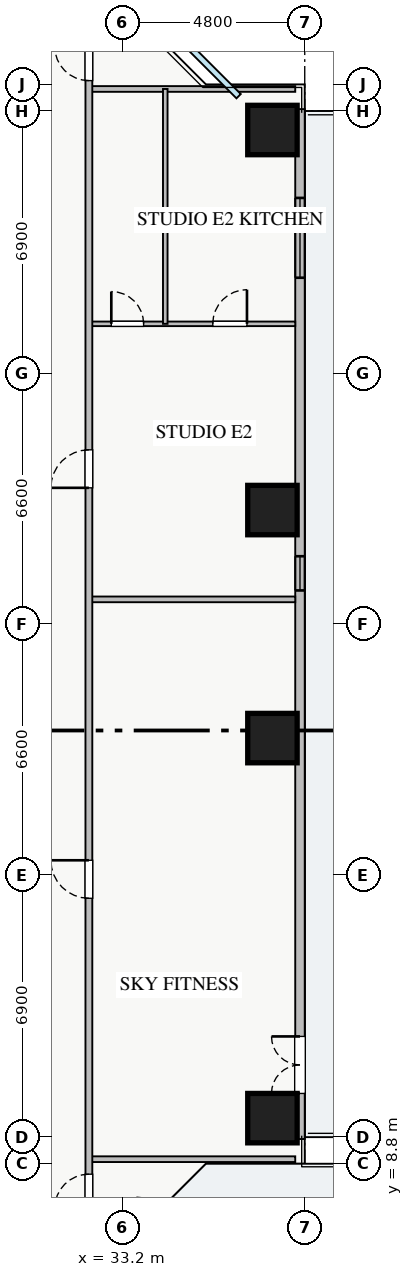
"""IFC4 building model, lengths in metres.
Left out: names, types, materials, properties, quantities, classifications, styles, units other than length and angle.
Written with IfcOpenShell. Run it as: python <this file> out.ifc"""

import sys

from ifc_helpers import new_model, si_unit, direction, frame, frame_2d, origin, origin_2d, place, context, subcontext, project, spatial, rectangle, extrude, source, transform, mapped, element, fill, save


model = new_model("IFC4")
c1 = context("Model", 3, precision=1e-05, world=origin(), true_north=direction((0.0, 1.0)))
c2 = subcontext(c1, "Body", "Model", "MODEL_VIEW")
j1 = project(units=[si_unit("LENGTHUNIT", "METRE"), si_unit("PLANEANGLEUNIT", "RADIAN")], contexts=[c1])
p1 = place(None, origin())
s1 = spatial("IfcSite", under=j1, at=p1, CompositionType="ELEMENT")
p2 = place(p1, origin())
s2 = spatial("IfcBuilding", under=s1, at=p2, CompositionType="ELEMENT")
p3 = place(p2, frame((0.0, 0.0, 23.0)))
s3 = spatial("IfcBuildingStorey", under=s2, at=p3, CompositionType="ELEMENT", Elevation=23.0)
m1 = source(origin(), c2, "Body", "SweptSolid", [
    extrude(rectangle(XDim=1.3, YDim=1.3, at=origin_2d()), origin(), (0.0, 0.0, 1.0), 3.25),
])
for number, where, z_axis, x_axis in (
    (1, (37.15, 10.0, 0.0), (0.0, 0.0, 1.0), (1.0, 0.0, 0.0)),
    (2, (37.15, 20.0, 0.0), (0.0, 0.0, 1.0), (1.0, 0.0, 0.0)),
    (3, (37.15, 26.0, 0.0), (0.0, 0.0, 1.0), (1.0, 0.0, 0.0)),
    (4, (37.15, 36.0, 0.0), (0.0, 0.0, 1.0), (1.0, 0.0, 0.0)),
):
    element("IfcColumn", number, at=place(p3, frame(where, z_axis=z_axis, x_axis=x_axis)), inside=s3, PredefinedType="COLUMN", context=c2, shape_type="MappedRepresentation", body=[
        mapped(m1, transform((0.0, 0.0, 0.0), x_axis=(1.0, 0.0, 0.0), y_axis=(0.0, 1.0, 0.0), z_axis=(0.0, 0.0, 1.0), scale=1.0)),
    ])
p4 = place(p3, frame((37.875, 9.45, 0.0), z_axis=(0.0, 0.0, 1.0), x_axis=(0.0, 1.0, 0.0)))
e5 = element("IfcWall", 5, at=p4, inside=s3, PredefinedType="STANDARD", context=c2, shape_type="SweptSolid", body=[
    extrude(rectangle(XDim=27.1, YDim=0.25, at=frame_2d((13.55, 0.0))), origin(), (0.0, 0.0, 1.0), 2.61),
])
p5 = place(p4, frame((1.2, 0.0, 0.0)))
e6 = element("IfcOpeningElement", 6, at=p5, cuts=e5, PredefinedType="OPENING", context=c2, shape_type="SweptSolid", body=[
    extrude(rectangle(XDim=1.5, YDim=2.15, at=frame_2d((0.75, 1.075))), frame((0.0, 0.135, 0.0), z_axis=(0.0, -1.0, 0.0), x_axis=(1.0, 0.0, 0.0)), (0.0, 0.0, 1.0), 0.27),
])
p6 = place(p4, frame((22.663, 0.0, 0.9)))
e7 = element("IfcOpeningElement", 7, at=p6, cuts=e5, PredefinedType="OPENING", context=c2, shape_type="SweptSolid", body=[
    extrude(rectangle(XDim=2.1, YDim=1.48, at=frame_2d((1.05, 0.74))), frame((0.0, 0.135, 0.0), z_axis=(0.0, -1.0, 0.0), x_axis=(1.0, 0.0, 0.0)), (0.0, 0.0, 1.0), 0.27),
])
p7 = place(p4, frame((14.435, 0.0, 0.9)))
e8 = element("IfcOpeningElement", 8, at=p7, cuts=e5, PredefinedType="OPENING", context=c2, shape_type="SweptSolid", body=[
    extrude(rectangle(XDim=0.9, YDim=1.2, at=frame_2d((0.45, 0.6))), frame((0.0, 0.135, 0.0), z_axis=(0.0, -1.0, 0.0), x_axis=(1.0, 0.0, 0.0)), (0.0, 0.0, 1.0), 0.27),
])
for number, where, z_axis, x_axis in (
    (9, (32.32, 37.08, 0.0), (0.0, 0.0, 1.0), (1.0, 0.0, 0.0)),
    (10, (32.32, 8.92, 0.0), (0.0, 0.0, 1.0), (1.0, 0.0, 0.0)),
):
    element("IfcWall", number, at=place(p3, frame(where, z_axis=z_axis, x_axis=x_axis)), inside=s3, PredefinedType="PARTITIONING", context=c2, shape_type="SweptSolid", body=[
        extrude(rectangle(XDim=5.43, YDim=0.15, at=frame_2d((2.715, 0.0))), origin(), (0.0, 0.0, 1.0), 3.07),
    ])
p8 = place(p3, frame((32.32, 30.9, 0.0), z_axis=(0.0, 0.0, 1.0), x_axis=(1.0, 0.0, 0.0)))
e11 = element("IfcWall", 11, at=p8, inside=s3, PredefinedType="PLUMBINGWALL", context=c2, shape_type="SweptSolid", body=[
    extrude(rectangle(XDim=5.43, YDim=0.12, at=frame_2d((2.715, 0.0))), origin(), (0.0, 0.0, 1.0), 3.07),
])
p9 = place(p8, frame((0.59, 0.0, 0.0)))
e12 = element("IfcOpeningElement", 12, at=p9, cuts=e11, PredefinedType="OPENING", context=c2, shape_type="SweptSolid", body=[
    extrude(rectangle(XDim=0.85, YDim=2.05, at=frame_2d((0.425, 1.025))), frame((0.0, 0.07, 0.0), z_axis=(0.0, -1.0, 0.0), x_axis=(1.0, 0.0, 0.0)), (0.0, 0.0, 1.0), 0.14),
])
p10 = place(p8, frame((3.26, 0.0, 0.0)))
e13 = element("IfcOpeningElement", 13, at=p10, cuts=e11, PredefinedType="OPENING", context=c2, shape_type="SweptSolid", body=[
    extrude(rectangle(XDim=0.9, YDim=2.05, at=frame_2d((0.45, 1.025))), frame((0.0, 0.07, 0.0), z_axis=(0.0, -1.0, 0.0), x_axis=(1.0, 0.0, 0.0)), (0.0, 0.0, 1.0), 0.14),
])
p11 = place(p3, frame((34.33, 30.9, 0.0), z_axis=(0.0, 0.0, 1.0), x_axis=(0.0, 1.0, 0.0)))
e14 = element("IfcWall", 14, at=p11, inside=s3, PredefinedType="PLUMBINGWALL", context=c2, shape_type="SweptSolid", body=[
    extrude(rectangle(XDim=6.18, YDim=0.12, at=frame_2d((3.09, 0.0))), origin(), (0.0, 0.0, 1.0), 3.07),
])
p12 = place(p3, frame((32.32, 23.65, 0.0), z_axis=(0.0, 0.0, 1.0), x_axis=(1.0, 0.0, 0.0)))
e15 = element("IfcWall", 15, at=p12, inside=s3, PredefinedType="PARTITIONING", context=c2, shape_type="SweptSolid", body=[
    extrude(rectangle(XDim=5.43, YDim=0.15, at=frame_2d((2.715, 0.0))), origin(), (0.0, 0.0, 1.0), 3.07),
])
p13 = place(p3, frame((32.32, 7.21, 0.0), z_axis=(0.0, 0.0, 1.0), x_axis=(0.0, 1.0, 0.0)))
e16 = element("IfcWall", 16, at=p13, inside=s3, PredefinedType="PARTITIONING", context=c2, shape_type="SweptSolid", body=[
    extrude(rectangle(XDim=31.23, YDim=0.18, at=frame_2d((15.615, 0.0))), origin(), (0.0, 0.0, 1.0), 2.865),
])
p14 = place(p13, frame((30.09, 0.0, 0.0)))
e17 = element("IfcOpeningElement", 17, at=p14, cuts=e16, PredefinedType="OPENING", context=c2, shape_type="SweptSolid", body=[
    extrude(rectangle(XDim=0.9, YDim=2.05, at=frame_2d((0.45, 1.025))), frame((0.0, 0.1, 0.0), z_axis=(0.0, -1.0, 0.0), x_axis=(1.0, 0.0, 0.0)), (0.0, 0.0, 1.0), 0.2),
])
p15 = place(p13, frame((0.415, 0.0, 0.0)))
e18 = element("IfcOpeningElement", 18, at=p15, cuts=e16, PredefinedType="OPENING", context=c2, shape_type="SweptSolid", body=[
    extrude(rectangle(XDim=0.9, YDim=2.05, at=frame_2d((0.45, 1.025))), frame((0.0, 0.1, 0.0), z_axis=(0.0, -1.0, 0.0), x_axis=(1.0, 0.0, 0.0)), (0.0, 0.0, 1.0), 0.2),
])
p16 = place(p13, frame((8.575, 0.0, 0.0)))
e19 = element("IfcOpeningElement", 19, at=p16, cuts=e16, PredefinedType="OPENING", context=c2, shape_type="SweptSolid", body=[
    extrude(rectangle(XDim=1.0, YDim=2.05, at=frame_2d((0.5, 1.025))), frame((0.0, 0.1, 0.0), z_axis=(0.0, -1.0, 0.0), x_axis=(1.0, 0.0, 0.0)), (0.0, 0.0, 1.0), 0.2),
])
p17 = place(p13, frame((19.375, 0.0, 0.0)))
e20 = element("IfcOpeningElement", 20, at=p17, cuts=e16, PredefinedType="OPENING", context=c2, shape_type="SweptSolid", body=[
    extrude(rectangle(XDim=1.0, YDim=2.05, at=frame_2d((0.5, 1.025))), frame((0.0, 0.1, 0.0), z_axis=(0.0, -1.0, 0.0), x_axis=(1.0, 0.0, 0.0)), (0.0, 0.0, 1.0), 0.2),
])
m2 = source(origin(), c2, "Body", "SweptSolid", [
    extrude(rectangle(XDim=1.5, YDim=2.15, at=frame_2d((0.75, 1.075))), frame((0.0, 0.025, 0.0), z_axis=(0.0, -1.0, 0.0), x_axis=(1.0, 0.0, 0.0)), (0.0, 0.0, 1.0), 0.05),
])
p18 = place(p5, origin())
e21 = element("IfcDoor", 21, at=p18, inside=s3, OperationType="DOUBLE_DOOR_SINGLE_SWING", PredefinedType="DOOR", context=c2, shape_type="MappedRepresentation", body=[
    mapped(m2, transform((0.0, 0.0, 0.0), x_axis=(1.0, 0.0, 0.0), y_axis=(0.0, 1.0, 0.0), z_axis=(0.0, 0.0, 1.0), scale=1.0)),
])
fill(e6, e21)
m3 = source(origin(), c2, "Body", "SweptSolid", [
    extrude(rectangle(XDim=2.1, YDim=1.48, at=frame_2d((1.05, 0.74))), frame((0.0, 0.03, 0.0), z_axis=(0.0, -1.0, 0.0), x_axis=(1.0, 0.0, 0.0)), (0.0, 0.0, 1.0), 0.06),
])
p19 = place(p6, origin())
e22 = element("IfcWindow", 22, at=p19, inside=s3, PartitioningType="TRIPLE_PANEL_VERTICAL", PredefinedType="WINDOW", context=c2, shape_type="MappedRepresentation", body=[
    mapped(m3, transform((0.0, 0.0, 0.0), x_axis=(1.0, 0.0, 0.0), y_axis=(0.0, 1.0, 0.0), z_axis=(0.0, 0.0, 1.0), scale=1.0)),
])
fill(e7, e22)
m4 = source(origin(), c2, "Body", "SweptSolid", [
    extrude(rectangle(XDim=0.85, YDim=2.05, at=frame_2d((0.425, 1.025))), frame((0.0, 0.025, 0.0), z_axis=(0.0, -1.0, 0.0), x_axis=(1.0, 0.0, 0.0)), (0.0, 0.0, 1.0), 0.05),
])
p20 = place(p9, origin())
e23 = element("IfcDoor", 23, at=p20, inside=s3, OperationType="SINGLE_SWING_LEFT", PredefinedType="DOOR", context=c2, shape_type="MappedRepresentation", body=[
    mapped(m4, transform((0.0, 0.0, 0.0), x_axis=(1.0, 0.0, 0.0), y_axis=(0.0, 1.0, 0.0), z_axis=(0.0, 0.0, 1.0), scale=1.0)),
])
fill(e12, e23)
m5 = source(origin(), c2, "Body", "SweptSolid", [
    extrude(rectangle(XDim=0.9, YDim=2.05, at=frame_2d((0.45, 1.025))), frame((0.0, 0.025, 0.0), z_axis=(0.0, -1.0, 0.0), x_axis=(1.0, 0.0, 0.0)), (0.0, 0.0, 1.0), 0.05),
])
p21 = place(p10, origin())
e24 = element("IfcDoor", 24, at=p21, inside=s3, OperationType="SINGLE_SWING_RIGHT", PredefinedType="DOOR", context=c2, shape_type="MappedRepresentation", body=[
    mapped(m5, transform((0.0, 0.0, 0.0), x_axis=(1.0, 0.0, 0.0), y_axis=(0.0, 1.0, 0.0), z_axis=(0.0, 0.0, 1.0), scale=1.0)),
])
fill(e13, e24)
p22 = place(p14, origin())
e25 = element("IfcDoor", 25, at=p22, inside=s3, OperationType="SINGLE_SWING_RIGHT", PredefinedType="DOOR", context=c2, shape_type="MappedRepresentation", body=[
    mapped(m5, transform((0.0, 0.0, 0.0), x_axis=(1.0, 0.0, 0.0), y_axis=(0.0, 1.0, 0.0), z_axis=(0.0, 0.0, 1.0), scale=1.0)),
])
fill(e17, e25)
p23 = place(p15, origin())
e26 = element("IfcDoor", 26, at=p23, inside=s3, OperationType="SINGLE_SWING_LEFT", PredefinedType="DOOR", context=c2, shape_type="MappedRepresentation", body=[
    mapped(m5, transform((0.0, 0.0, 0.0), x_axis=(1.0, 0.0, 0.0), y_axis=(0.0, 1.0, 0.0), z_axis=(0.0, 0.0, 1.0), scale=1.0)),
])
fill(e18, e26)
m6 = source(origin(), c2, "Body", "SweptSolid", [
    extrude(rectangle(XDim=1.0, YDim=2.05, at=frame_2d((0.5, 1.025))), frame((0.0, 0.025, 0.0), z_axis=(0.0, -1.0, 0.0), x_axis=(1.0, 0.0, 0.0)), (0.0, 0.0, 1.0), 0.05),
])
p24 = place(p16, origin())
e27 = element("IfcDoor", 27, at=p24, inside=s3, OperationType="SINGLE_SWING_RIGHT", PredefinedType="DOOR", context=c2, shape_type="MappedRepresentation", body=[
    mapped(m6, transform((0.0, 0.0, 0.0), x_axis=(1.0, 0.0, 0.0), y_axis=(0.0, 1.0, 0.0), z_axis=(0.0, 0.0, 1.0), scale=1.0)),
])
fill(e19, e27)
p25 = place(p17, origin())
e28 = element("IfcDoor", 28, at=p25, inside=s3, OperationType="SINGLE_SWING_LEFT", PredefinedType="DOOR", context=c2, shape_type="MappedRepresentation", body=[
    mapped(m6, transform((0.0, 0.0, 0.0), x_axis=(1.0, 0.0, 0.0), y_axis=(0.0, 1.0, 0.0), z_axis=(0.0, 0.0, 1.0), scale=1.0)),
])
fill(e20, e28)
m7 = source(origin(), c2, "Body", "SweptSolid", [
    extrude(rectangle(XDim=0.9, YDim=1.2, at=frame_2d((0.45, 0.6))), frame((0.0, 0.03, 0.0), z_axis=(0.0, -1.0, 0.0), x_axis=(1.0, 0.0, 0.0)), (0.0, 0.0, 1.0), 0.06),
])
p26 = place(p7, origin())
e29 = element("IfcWindow", 29, at=p26, inside=s3, PartitioningType="SINGLE_PANEL", PredefinedType="WINDOW", context=c2, shape_type="MappedRepresentation", body=[
    mapped(m7, transform((0.0, 0.0, 0.0), x_axis=(1.0, 0.0, 0.0), y_axis=(0.0, 1.0, 0.0), z_axis=(0.0, 0.0, 1.0), scale=1.0)),
])
fill(e8, e29)
save(model, sys.argv[1])
